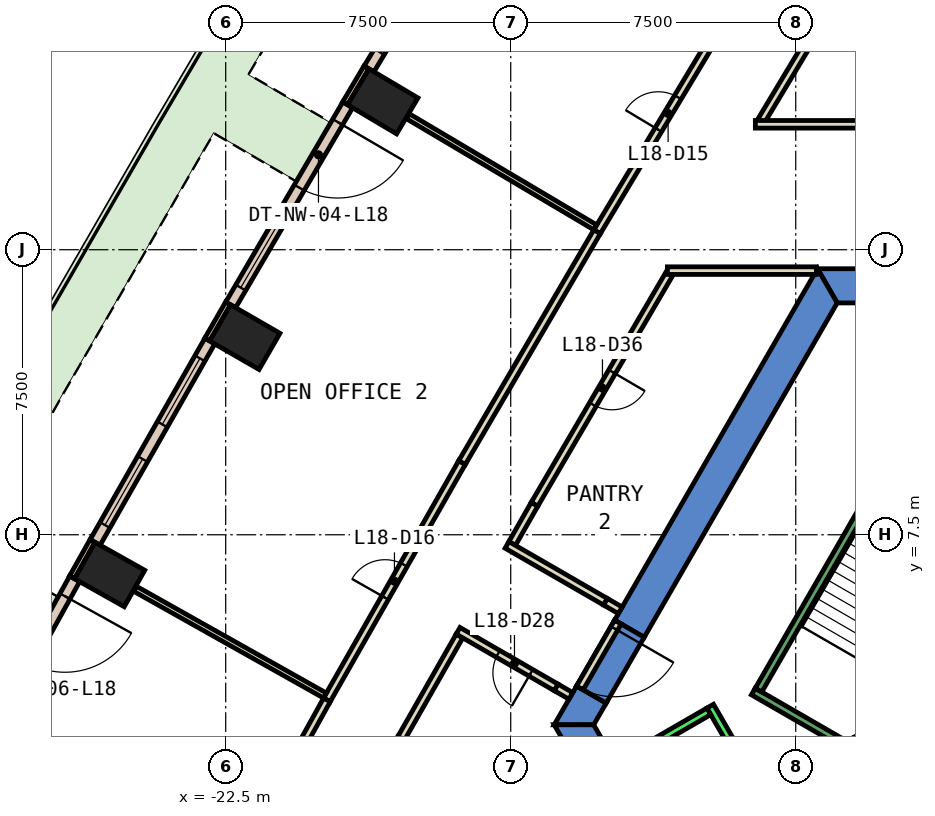
"""IFC4 building model, lengths in metres.
Left out: names, types, materials, properties, quantities, classifications, styles, units other than length and angle.
Written with IfcOpenShell. Run it as: python <this file> out.ifc"""

import sys

from ifc_helpers import new_model, si_unit, direction, frame, frame_2d, origin, origin_2d, place, context, subcontext, project, spatial, polyline, rectangle, outline, extrude, element, fill, save


model = new_model("IFC4")
c1 = context("Model", 3, precision=1e-05, world=origin(), true_north=direction((0.0, 1.0)))
c2 = subcontext(c1, "Body", "Model", "MODEL_VIEW")
j1 = project(units=[si_unit("LENGTHUNIT", "METRE"), si_unit("PLANEANGLEUNIT", "RADIAN")], contexts=[c1])
p1 = place(None, origin())
s1 = spatial("IfcSite", under=j1, at=p1, CompositionType="ELEMENT")
p2 = place(p1, origin())
s2 = spatial("IfcBuilding", under=s1, at=p2, CompositionType="ELEMENT")
p3 = place(p2, frame((0.0, 0.0, 86.6)))
s3 = spatial("IfcBuildingStorey", under=s2, at=p3, CompositionType="ELEMENT", Elevation=86.6)
for number, where, z_axis, x_axis in (
    (1, (-18.367, 18.904, 0.0), (0.0, 0.0, 1.0), (0.51, 0.86, 0.0)),
    (2, (-21.997, 12.7, 0.0), (0.0, 0.0, 1.0), (0.5, 0.866, 0.0)),
    (3, (-25.554, 6.454, 0.0), (0.0, 0.0, 1.0), (0.49, 0.872, 0.0)),
):
    element("IfcColumn", number, at=place(p3, frame(where, z_axis=z_axis, x_axis=x_axis)), inside=s3, PredefinedType="COLUMN", context=c2, shape_type="SweptSolid", body=[
        extrude(rectangle(XDim=1.1, YDim=1.5, at=origin_2d()), origin(), (0.0, 0.0, 1.0), 3.8),
    ])
p4 = place(p3, frame((0.0, 0.0, -0.6)))
e4 = element("IfcWall", 4, at=p4, inside=s3, PredefinedType="SHEAR", context=c2, shape_type="SweptSolid", body=[
    extrude(outline(polyline([(-4.55, 13.6), (-4.55, 14.5), (-6.928, 14.5), (-6.409, 13.6), (-4.55, 13.6)])), origin(), (0.0, 0.0, 1.0), 4.4),
])
p5 = place(p3, frame((0.0, 0.0, -0.6)))
e5 = element("IfcWall", 5, at=p5, inside=s3, PredefinedType="SHEAR", context=c2, shape_type="SweptSolid", body=[
    extrude(outline(polyline([(-12.267, 5.252), (-11.488, 4.802), (-6.409, 13.6), (-6.928, 14.5), (-12.267, 5.252)])), origin(), (0.0, 0.0, 1.0), 4.4),
])
p6 = place(p3, frame((0.0, 0.0, -0.6)))
e6 = element("IfcWall", 6, at=p6, inside=s3, PredefinedType="SHEAR", context=c2, shape_type="SweptSolid", body=[
    extrude(outline(polyline([(-12.488, 3.07), (-13.267, 3.52), (-13.856, 2.5), (-12.817, 2.5), (-12.488, 3.07)])), origin(), (0.0, 0.0, 1.0), 4.4),
])
p7 = place(p3, frame((0.0, 0.0, 3.6)))
e7 = element("IfcWall", 7, at=p7, inside=s3, PredefinedType="SHEAR", context=c2, shape_type="SweptSolid", body=[
    extrude(outline(polyline([(-13.267, 3.52), (-12.488, 3.07), (-11.488, 4.802), (-12.267, 5.252), (-13.267, 3.52)])), origin(), (0.0, 0.0, 1.0), 0.2),
])
p8 = place(p3, frame((0.0, 0.0, -0.6)))
e8 = element("IfcWall", 8, at=p8, inside=s3, PredefinedType="SHEAR", context=c2, shape_type="SweptSolid", body=[
    extrude(outline(polyline([(-13.856, 2.5), (-6.928, -9.5), (-6.409, -8.6), (-12.817, 2.5), (-13.856, 2.5)])), origin(), (0.0, 0.0, 1.0), 4.4),
])
p9 = place(p3, frame((-18.796, 19.798, 0.0), z_axis=(0.0, 0.0, 1.0), x_axis=(-0.510082245696, -0.860125631885, 0.0)))
e9 = element("IfcWall", 9, at=p9, inside=s3, PredefinedType="STANDARD", context=c2, shape_type="SweptSolid", body=[
    extrude(rectangle(XDim=1.1, YDim=0.15, at=frame_2d((0.55, 0.0))), origin(), (0.0, 0.0, 1.0), 3.8),
])
p10 = place(p3, frame((-22.436, 13.589, 0.0), z_axis=(0.0, 0.0, 1.0), x_axis=(-0.499837685251, -0.86611909597, 0.0)))
e10 = element("IfcWall", 10, at=p10, inside=s3, PredefinedType="STANDARD", context=c2, shape_type="SweptSolid", body=[
    extrude(rectangle(XDim=1.1, YDim=0.15, at=frame_2d((0.55, 0.0))), origin(), (0.0, 0.0, 1.0), 3.8),
])
p11 = place(p3, frame((-26.004, 7.338, 0.0), z_axis=(0.0, 0.0, 1.0), x_axis=(-0.490008344094, -0.871717742574, 0.0)))
e11 = element("IfcWall", 11, at=p11, inside=s3, PredefinedType="STANDARD", context=c2, shape_type="SweptSolid", body=[
    extrude(rectangle(XDim=1.1, YDim=0.15, at=frame_2d((0.55, 0.0))), origin(), (0.0, 0.0, 1.0), 3.8),
])
p12 = place(p3, frame((-15.588, 24.984, 0.0), z_axis=(0.0, 0.0, 1.0), x_axis=(-0.515102053092, -0.857128855483, 0.0)))
e12 = element("IfcWall", 12, at=p12, inside=s3, PredefinedType="STANDARD", context=c2, shape_type="SweptSolid", body=[
    extrude(rectangle(XDim=6.098, YDim=0.3, at=frame_2d((3.049, 0.0))), origin(), (0.0, 0.0, 1.0), 3.8),
])
p13 = place(p12, frame((0.525, 0.0, 0.9)))
e13 = element("IfcOpeningElement", 13, at=p13, cuts=e12, PredefinedType="OPENING", context=c2, shape_type="SweptSolid", body=[
    extrude(rectangle(XDim=2.0, YDim=2.6, at=frame_2d((1.0, 1.3))), frame((0.0, 0.16, 0.0), z_axis=(0.0, -1.0, 0.0), x_axis=(1.0, 0.0, 0.0)), (0.0, 0.0, 1.0), 0.32),
])
p14 = place(p12, frame((3.574, 0.0, 0.9)))
e14 = element("IfcOpeningElement", 14, at=p14, cuts=e12, PredefinedType="OPENING", context=c2, shape_type="SweptSolid", body=[
    extrude(rectangle(XDim=2.0, YDim=2.6, at=frame_2d((1.0, 1.3))), frame((0.0, 0.16, 0.0), z_axis=(0.0, -1.0, 0.0), x_axis=(1.0, 0.0, 0.0)), (0.0, 0.0, 1.0), 0.32),
])
p15 = place(p3, frame((-19.289, 18.813, 0.0), z_axis=(0.0, 0.0, 1.0), x_axis=(-0.504998117261, -0.863120444413, 0.0)))
e15 = element("IfcWall", 15, at=p15, inside=s3, PredefinedType="STANDARD", context=c2, shape_type="SweptSolid", body=[
    extrude(rectangle(XDim=6.099, YDim=0.3, at=frame_2d((3.049, 0.0))), origin(), (0.0, 0.0, 1.0), 3.8),
])
p16 = place(p15, frame((0.525, 0.0, 0.0)))
e16 = element("IfcOpeningElement", 16, at=p16, cuts=e15, PredefinedType="OPENING", context=c2, shape_type="SweptSolid", body=[
    extrude(rectangle(XDim=2.0, YDim=2.4, at=frame_2d((1.0, 1.2))), frame((0.0, 0.16, 0.0), z_axis=(0.0, -1.0, 0.0), x_axis=(1.0, 0.0, 0.0)), (0.0, 0.0, 1.0), 0.32),
])
p17 = place(p15, frame((3.574, 0.0, 0.9)))
e17 = element("IfcOpeningElement", 17, at=p17, cuts=e15, PredefinedType="OPENING", context=c2, shape_type="SweptSolid", body=[
    extrude(rectangle(XDim=2.0, YDim=2.6, at=frame_2d((1.0, 1.3))), frame((0.0, 0.16, 0.0), z_axis=(0.0, -1.0, 0.0), x_axis=(1.0, 0.0, 0.0)), (0.0, 0.0, 1.0), 0.32),
])
p18 = place(p3, frame((-22.918, 12.598, 0.0), z_axis=(0.0, 0.0, 1.0), x_axis=(-0.49492259535, -0.868937065967, 0.0)))
e18 = element("IfcWall", 18, at=p18, inside=s3, PredefinedType="STANDARD", context=c2, shape_type="SweptSolid", body=[
    extrude(rectangle(XDim=6.098, YDim=0.3, at=frame_2d((3.049, 0.0))), origin(), (0.0, 0.0, 1.0), 3.8),
])
p19 = place(p18, frame((0.525, 0.0, 0.9)))
e19 = element("IfcOpeningElement", 19, at=p19, cuts=e18, PredefinedType="OPENING", context=c2, shape_type="SweptSolid", body=[
    extrude(rectangle(XDim=2.0, YDim=2.6, at=frame_2d((1.0, 1.3))), frame((0.0, 0.16, 0.0), z_axis=(0.0, -1.0, 0.0), x_axis=(1.0, 0.0, 0.0)), (0.0, 0.0, 1.0), 0.32),
])
p20 = place(p18, frame((3.574, 0.0, 0.9)))
e20 = element("IfcOpeningElement", 20, at=p20, cuts=e18, PredefinedType="OPENING", context=c2, shape_type="SweptSolid", body=[
    extrude(rectangle(XDim=2.0, YDim=2.6, at=frame_2d((1.0, 1.3))), frame((0.0, 0.16, 0.0), z_axis=(0.0, -1.0, 0.0), x_axis=(1.0, 0.0, 0.0)), (0.0, 0.0, 1.0), 0.32),
])
p21 = place(p3, frame((-26.474, 6.341, 0.0), z_axis=(0.0, 0.0, 1.0), x_axis=(-0.484823579315, -0.874611969356, 0.0)))
e21 = element("IfcWall", 21, at=p21, inside=s3, PredefinedType="STANDARD", context=c2, shape_type="SweptSolid", body=[
    extrude(rectangle(XDim=6.099, YDim=0.3, at=frame_2d((3.049, 0.0))), origin(), (0.0, 0.0, 1.0), 3.8),
])
p22 = place(p21, frame((0.525, 0.0, 0.0)))
e22 = element("IfcOpeningElement", 22, at=p22, cuts=e21, PredefinedType="OPENING", context=c2, shape_type="SweptSolid", body=[
    extrude(rectangle(XDim=2.0, YDim=2.4, at=frame_2d((1.0, 1.2))), frame((0.0, 0.16, 0.0), z_axis=(0.0, -1.0, 0.0), x_axis=(1.0, 0.0, 0.0)), (0.0, 0.0, 1.0), 0.32),
])
p23 = place(p21, frame((3.574, 0.0, 0.9)))
e23 = element("IfcOpeningElement", 23, at=p23, cuts=e21, PredefinedType="OPENING", context=c2, shape_type="SweptSolid", body=[
    extrude(rectangle(XDim=2.0, YDim=2.6, at=frame_2d((1.0, 1.3))), frame((0.0, 0.16, 0.0), z_axis=(0.0, -1.0, 0.0), x_axis=(1.0, 0.0, 0.0)), (0.0, 0.0, 1.0), 0.32),
])
p24 = place(p3, frame((-7.148, 20.488, 0.0), z_axis=(0.0, 0.0, 1.0), x_axis=(-0.515008089027, -0.857185317325, 0.0)))
e24 = element("IfcWall", 24, at=p24, inside=s3, PredefinedType="PARTITIONING", context=c2, shape_type="SweptSolid", body=[
    extrude(rectangle(XDim=2.452, YDim=0.2, at=frame_2d((1.226, 0.0))), origin(), (0.0, 0.0, 1.0), 3.8),
])
p25 = place(p3, frame((-10.797, 14.415, 0.0), z_axis=(0.0, 0.0, 1.0), x_axis=(-0.505008297342, -0.863114488128, 0.0)))
e25 = element("IfcWall", 25, at=p25, inside=s3, PredefinedType="PARTITIONING", context=c2, shape_type="SweptSolid", body=[
    extrude(rectangle(XDim=7.085, YDim=0.2, at=frame_2d((3.542, 0.0))), origin(), (0.0, 0.0, 1.0), 3.8),
])
p26 = place(p25, frame((3.043, 0.0, 0.0)))
e26 = element("IfcOpeningElement", 26, at=p26, cuts=e25, PredefinedType="OPENING", context=c2, shape_type="SweptSolid", body=[
    extrude(rectangle(XDim=1.0, YDim=2.1, at=frame_2d((0.5, 1.05))), frame((0.0, 0.11, 0.0), z_axis=(0.0, -1.0, 0.0), x_axis=(1.0, 0.0, 0.0)), (0.0, 0.0, 1.0), 0.22),
])
p27 = place(p3, frame((-14.375, 8.3, 0.0), z_axis=(0.0, 0.0, 1.0), x_axis=(-0.495074026382, -0.868850797549, 0.0)))
e27 = element("IfcWall", 27, at=p27, inside=s3, PredefinedType="PARTITIONING", context=c2, shape_type="SweptSolid", body=[
    extrude(rectangle(XDim=1.186, YDim=0.2, at=frame_2d((0.593, 0.0))), origin(), (0.0, 0.0, 1.0), 3.8),
])
p28 = place(p3, frame((-15.098, 7.233, 0.0), z_axis=(0.0, 0.0, 1.0), x_axis=(0.866101363304, -0.499868411168, 0.0)))
e28 = element("IfcWall", 28, at=p28, inside=s3, PredefinedType="PARTITIONING", context=c2, shape_type="SweptSolid", body=[
    extrude(rectangle(XDim=2.992, YDim=0.2, at=frame_2d((1.496, 0.0))), origin(), (0.0, 0.0, 1.0), 3.8),
])
p29 = place(p3, frame((-13.417, 3.26, 0.0), z_axis=(0.0, 0.0, 1.0), x_axis=(-0.866032067792, 0.499988457423, 0.0)))
e29 = element("IfcWall", 29, at=p29, inside=s3, PredefinedType="PARTITIONING", context=c2, shape_type="SweptSolid", body=[
    extrude(rectangle(XDim=0.45, YDim=0.2, at=frame_2d((0.225, 0.0))), origin(), (0.0, 0.0, 1.0), 2.4),
])
p30 = place(p3, frame((-16.348, 4.837, 0.0), z_axis=(0.0, 0.0, 1.0), x_axis=(-0.495121026513, -0.868824015037, 0.0)))
e30 = element("IfcWall", 30, at=p30, inside=s3, PredefinedType="PARTITIONING", context=c2, shape_type="SweptSolid", body=[
    extrude(rectangle(XDim=3.101, YDim=0.2, at=frame_2d((1.55, 0.0))), origin(), (0.0, 0.0, 1.0), 3.8),
])
p31 = place(p3, frame((-12.728, 15.473, 0.0), z_axis=(0.0, 0.0, 1.0), x_axis=(0.515010673306, 0.857183764651, 0.0)))
e31 = element("IfcWall", 31, at=p31, inside=s3, PredefinedType="PARTITIONING", context=c2, shape_type="SweptSolid", body=[
    extrude(rectangle(XDim=7.111, YDim=0.2, at=frame_2d((3.555, 0.0))), origin(), (0.0, 0.0, 1.0), 3.8),
])
p32 = place(p31, frame((3.13, 0.0, 0.0)))
e32 = element("IfcOpeningElement", 32, at=p32, cuts=e31, PredefinedType="OPENING", context=c2, shape_type="SweptSolid", body=[
    extrude(rectangle(XDim=1.0, YDim=2.1, at=frame_2d((0.5, 1.05))), frame((0.0, 0.11, 0.0), z_axis=(0.0, -1.0, 0.0), x_axis=(1.0, 0.0, 0.0)), (0.0, 0.0, 1.0), 0.22),
])
p33 = place(p3, frame((-19.838, 3.156, 0.0), z_axis=(0.0, 0.0, 1.0), x_axis=(0.494978648769, 0.868905137091, 0.0)))
e33 = element("IfcWall", 33, at=p33, inside=s3, PredefinedType="PARTITIONING", context=c2, shape_type="SweptSolid", body=[
    extrude(rectangle(XDim=7.186, YDim=0.2, at=frame_2d((3.593, 0.0))), origin(), (0.0, 0.0, 1.0), 3.8),
])
p34 = place(p33, frame((3.093, 0.0, 0.0)))
e34 = element("IfcOpeningElement", 34, at=p34, cuts=e33, PredefinedType="OPENING", context=c2, shape_type="SweptSolid", body=[
    extrude(rectangle(XDim=1.0, YDim=2.1, at=frame_2d((0.5, 1.05))), frame((0.0, 0.11, 0.0), z_axis=(0.0, -1.0, 0.0), x_axis=(1.0, 0.0, 0.0)), (0.0, 0.0, 1.0), 0.22),
])
p35 = place(p3, frame((-16.281, 9.4, 0.0), z_axis=(0.0, 0.0, 1.0), x_axis=(0.504973069247, 0.863135099121, 0.0)))
e35 = element("IfcWall", 35, at=p35, inside=s3, PredefinedType="PARTITIONING", context=c2, shape_type="SweptSolid", body=[
    extrude(rectangle(XDim=7.036, YDim=0.2, at=frame_2d((3.518, 0.0))), origin(), (0.0, 0.0, 1.0), 3.8),
])
p36 = place(p3, frame((-23.284, -3.064, 0.0), z_axis=(0.0, 0.0, 1.0), x_axis=(0.48478560119, 0.874633020689, 0.0)))
e36 = element("IfcWall", 36, at=p36, inside=s3, PredefinedType="PARTITIONING", context=c2, shape_type="SweptSolid", body=[
    extrude(rectangle(XDim=7.11, YDim=0.2, at=frame_2d((3.555, 0.0))), origin(), (0.0, 0.0, 1.0), 3.8),
])
p37 = place(p36, frame((3.13, 0.0, 0.0)))
e37 = element("IfcOpeningElement", 37, at=p37, cuts=e36, PredefinedType="OPENING", context=c2, shape_type="SweptSolid", body=[
    extrude(rectangle(XDim=1.0, YDim=2.1, at=frame_2d((0.5, 1.05))), frame((0.0, 0.11, 0.0), z_axis=(0.0, -1.0, 0.0), x_axis=(1.0, 0.0, 0.0)), (0.0, 0.0, 1.0), 0.22),
])
p38 = place(p3, frame((-8.563, 18.3, 0.0), z_axis=(0.0, 0.0, 1.0), x_axis=(1.0, 0.0, 0.0)))
e38 = element("IfcWall", 38, at=p38, inside=s3, PredefinedType="PARTITIONING", context=c2, shape_type="SweptSolid", body=[
    extrude(rectangle(XDim=8.163, YDim=0.2, at=frame_2d((4.082, 0.0))), origin(), (0.0, 0.0, 1.0), 3.8),
])
p39 = place(p38, frame((3.806, 0.0, 0.0)))
e39 = element("IfcOpeningElement", 39, at=p39, cuts=e38, PredefinedType="OPENING", context=c2, shape_type="SweptSolid", body=[
    extrude(rectangle(XDim=1.0, YDim=2.1, at=frame_2d((0.5, 1.05))), frame((0.0, 0.11, 0.0), z_axis=(0.0, -1.0, 0.0), x_axis=(1.0, 0.0, 0.0)), (0.0, 0.0, 1.0), 0.22),
])
p40 = place(p38, frame((4.906, 0.0, 0.0)))
e40 = element("IfcOpeningElement", 40, at=p40, cuts=e38, PredefinedType="OPENING", context=c2, shape_type="SweptSolid", body=[
    extrude(rectangle(XDim=1.0, YDim=2.1, at=frame_2d((0.5, 1.05))), frame((0.0, 0.11, 0.0), z_axis=(0.0, -1.0, 0.0), x_axis=(1.0, 0.0, 0.0)), (0.0, 0.0, 1.0), 0.22),
])
p41 = place(p3, frame((-6.957, 14.45, 0.0), z_axis=(0.0, 0.0, 1.0), x_axis=(-1.0, 0.0, 0.0)))
e41 = element("IfcWall", 41, at=p41, inside=s3, PredefinedType="PARTITIONING", context=c2, shape_type="SweptSolid", body=[
    extrude(rectangle(XDim=3.92, YDim=0.2, at=frame_2d((1.96, 0.0))), origin(), (0.0, 0.0, 1.0), 3.8),
])
p42 = place(p3, frame((-12.776, 15.589, 0.0), z_axis=(0.0, 0.0, 1.0), x_axis=(-0.860225086153, 0.509914503768, 0.0)))
e42 = element("IfcWall", 42, at=p42, inside=s3, PredefinedType="PARTITIONING", context=c2, shape_type="SweptSolid", body=[
    extrude(rectangle(XDim=5.73, YDim=0.15, at=frame_2d((2.865, 0.0))), origin(), (0.0, 0.0, 1.0), 3.8),
])
p43 = place(p3, frame((-19.888, 3.27, 0.0), z_axis=(0.0, 0.0, 1.0), x_axis=(-0.871789386467, 0.489880868828, 0.0)))
e43 = element("IfcWall", 43, at=p43, inside=s3, PredefinedType="PARTITIONING", context=c2, shape_type="SweptSolid", body=[
    extrude(rectangle(XDim=5.73, YDim=0.15, at=frame_2d((2.865, 0.0))), origin(), (0.0, 0.0, 1.0), 3.8),
])
p44 = place(p3, frame((-12.18, 5.202, 0.0), z_axis=(0.0, 0.0, 1.0), x_axis=(-0.50002537861, -0.866010750942, 0.0)))
e44 = element("IfcWall", 44, at=p44, inside=s3, PredefinedType="PARTITIONING", context=c2, shape_type="SweptSolid", body=[
    extrude(rectangle(XDim=2.0, YDim=0.2, at=frame_2d((1.0, 0.0))), origin(), (0.0, 0.0, 1.0), 2.4),
])
p45 = place(p44, frame((0.19, 0.0, 0.0)))
e45 = element("IfcOpeningElement", 45, at=p45, cuts=e44, PredefinedType="OPENING", context=c2, shape_type="SweptSolid", body=[
    extrude(rectangle(XDim=1.8, YDim=2.1, at=frame_2d((0.9, 1.05))), frame((0.0, 0.11, 0.0), z_axis=(0.0, -1.0, 0.0), x_axis=(1.0, 0.0, 0.0)), (0.0, 0.0, 1.0), 0.22),
])
p46 = place(p3, frame((-12.506, 5.737, 0.0), z_axis=(0.0, 0.0, 1.0), x_axis=(0.865624510465, -0.500693725627, 0.0)))
e46 = element("IfcWall", 46, at=p46, inside=s3, PredefinedType="PARTITIONING", context=c2, shape_type="SweptSolid", body=[
    extrude(rectangle(XDim=0.449, YDim=0.2, at=frame_2d((0.225, 0.0))), origin(), (0.0, 0.0, 1.0), 2.4),
])
p47 = place(p3, frame((-13.807, 3.485, 0.0), z_axis=(0.0, 0.0, 1.0), x_axis=(-0.865947944451, 0.500134139508, 0.0)))
e47 = element("IfcWall", 47, at=p47, inside=s3, PredefinedType="PARTITIONING", context=c2, shape_type="SweptSolid", body=[
    extrude(rectangle(XDim=2.977, YDim=0.2, at=frame_2d((1.489, 0.0))), origin(), (0.0, 0.0, 1.0), 3.8),
])
p48 = place(p47, frame((0.764, 0.0, 0.0)))
e48 = element("IfcOpeningElement", 48, at=p48, cuts=e47, PredefinedType="OPENING", context=c2, shape_type="SweptSolid", body=[
    extrude(rectangle(XDim=1.0, YDim=2.1, at=frame_2d((0.5, 1.05))), frame((0.0, 0.11, 0.0), z_axis=(0.0, -1.0, 0.0), x_axis=(1.0, 0.0, 0.0)), (0.0, 0.0, 1.0), 0.22),
])
p49 = place(p3, frame((-5.94, 2.188, 0.0), z_axis=(0.0, 0.0, 1.0), x_axis=(0.49994636267, -0.866056369097, 0.0)))
e49 = element("IfcWall", 49, at=p49, inside=s3, PredefinedType="STANDARD", context=c2, shape_type="SweptSolid", body=[
    extrude(rectangle(XDim=2.8, YDim=0.2, at=frame_2d((1.4, 0.0))), origin(), (0.0, 0.0, 1.0), 3.8),
])
p50 = place(p49, frame((1.225, 0.0, 0.0)))
e50 = element("IfcOpeningElement", 50, at=p50, cuts=e49, PredefinedType="OPENING", context=c2, shape_type="SweptSolid", body=[
    extrude(rectangle(XDim=1.1, YDim=2.1, at=frame_2d((0.55, 1.05))), frame((0.0, 0.11, 0.0), z_axis=(0.0, -1.0, 0.0), x_axis=(1.0, 0.0, 0.0)), (0.0, 0.0, 1.0), 0.22),
])
p51 = place(p3, frame((-9.751, 2.99, 0.0), z_axis=(0.0, 0.0, 1.0), x_axis=(0.50000090737, -0.866024879913, 0.0)))
e51 = element("IfcWall", 51, at=p51, inside=s3, PredefinedType="STANDARD", context=c2, shape_type="SweptSolid", body=[
    extrude(rectangle(XDim=10.6, YDim=0.2, at=frame_2d((5.3, 0.0))), origin(), (0.0, 0.0, 1.0), 3.8),
])
p52 = place(p3, frame((-9.788, 2.853, 0.0), z_axis=(0.0, 0.0, 1.0), x_axis=(-0.865998541277, -0.500046524342, 0.0)))
e52 = element("IfcWall", 52, at=p52, inside=s3, PredefinedType="STANDARD", context=c2, shape_type="SweptSolid", body=[
    extrude(rectangle(XDim=2.5, YDim=0.2, at=frame_2d((1.25, 0.0))), origin(), (0.0, 0.0, 1.0), 3.8),
])
p53 = place(p3, frame((-6.25, 2.01, 0.0), z_axis=(0.0, 0.0, 1.0), x_axis=(-0.86611865017, 0.499838457731, 0.0)))
e53 = element("IfcWall", 53, at=p53, inside=s3, PredefinedType="STANDARD", context=c2, shape_type="SweptSolid", body=[
    extrude(rectangle(XDim=2.733, YDim=0.2, at=frame_2d((1.366, 0.0))), origin(), (0.0, 0.0, 1.0), 3.8),
])
p54 = place(p3, frame((-5.03, 9.388, 0.0), z_axis=(0.0, 0.0, 1.0), x_axis=(-0.499978703459, -0.866037698999, 0.0)))
e54 = element("IfcWall", 54, at=p54, inside=s3, PredefinedType="STANDARD", context=c2, shape_type="SweptSolid", body=[
    extrude(rectangle(XDim=6.9, YDim=0.2, at=frame_2d((3.45, 0.0))), origin(), (0.0, 0.0, 1.0), 3.8),
])
p55 = place(p14, origin())
e55 = element("IfcWindow", 55, at=p55, inside=s3, PartitioningType="SINGLE_PANEL", PredefinedType="WINDOW", context=c2, shape_type="SweptSolid", body=[
    extrude(rectangle(XDim=2.0, YDim=2.6, at=frame_2d((1.0, 1.3))), frame((0.0, 0.03, 0.0), z_axis=(0.0, -1.0, 0.0), x_axis=(1.0, 0.0, 0.0)), (0.0, 0.0, 1.0), 0.06),
])
fill(e14, e55)
p56 = place(p16, origin())
e56 = element("IfcDoor", 56, at=p56, inside=s3, OperationType="SLIDING_TO_LEFT", PredefinedType="DOOR", context=c2, shape_type="SweptSolid", body=[
    extrude(rectangle(XDim=2.0, YDim=2.4, at=frame_2d((1.0, 1.2))), frame((0.0, 0.025, 0.0), z_axis=(0.0, -1.0, 0.0), x_axis=(1.0, 0.0, 0.0)), (0.0, 0.0, 1.0), 0.05),
])
fill(e16, e56)
p57 = place(p17, origin())
e57 = element("IfcWindow", 57, at=p57, inside=s3, PartitioningType="SINGLE_PANEL", PredefinedType="WINDOW", context=c2, shape_type="SweptSolid", body=[
    extrude(rectangle(XDim=2.0, YDim=2.6, at=frame_2d((1.0, 1.3))), frame((0.0, 0.03, 0.0), z_axis=(0.0, -1.0, 0.0), x_axis=(1.0, 0.0, 0.0)), (0.0, 0.0, 1.0), 0.06),
])
fill(e17, e57)
p58 = place(p19, origin())
e58 = element("IfcWindow", 58, at=p58, inside=s3, PartitioningType="SINGLE_PANEL", PredefinedType="WINDOW", context=c2, shape_type="SweptSolid", body=[
    extrude(rectangle(XDim=2.0, YDim=2.6, at=frame_2d((1.0, 1.3))), frame((0.0, 0.03, 0.0), z_axis=(0.0, -1.0, 0.0), x_axis=(1.0, 0.0, 0.0)), (0.0, 0.0, 1.0), 0.06),
])
fill(e19, e58)
p59 = place(p20, origin())
e59 = element("IfcWindow", 59, at=p59, inside=s3, PartitioningType="SINGLE_PANEL", PredefinedType="WINDOW", context=c2, shape_type="SweptSolid", body=[
    extrude(rectangle(XDim=2.0, YDim=2.6, at=frame_2d((1.0, 1.3))), frame((0.0, 0.03, 0.0), z_axis=(0.0, -1.0, 0.0), x_axis=(1.0, 0.0, 0.0)), (0.0, 0.0, 1.0), 0.06),
])
fill(e20, e59)
p60 = place(p22, origin())
e60 = element("IfcDoor", 60, at=p60, inside=s3, OperationType="SLIDING_TO_LEFT", PredefinedType="DOOR", context=c2, shape_type="SweptSolid", body=[
    extrude(rectangle(XDim=2.0, YDim=2.4, at=frame_2d((1.0, 1.2))), frame((0.0, 0.025, 0.0), z_axis=(0.0, -1.0, 0.0), x_axis=(1.0, 0.0, 0.0)), (0.0, 0.0, 1.0), 0.05),
])
fill(e22, e60)
p61 = place(p32, origin())
e61 = element("IfcDoor", 61, at=p61, inside=s3, OperationType="SINGLE_SWING_LEFT", PredefinedType="DOOR", context=c2, shape_type="SweptSolid", body=[
    extrude(rectangle(XDim=1.0, YDim=2.1, at=frame_2d((0.5, 1.05))), frame((0.0, 0.025, 0.0), z_axis=(0.0, -1.0, 0.0), x_axis=(1.0, 0.0, 0.0)), (0.0, 0.0, 1.0), 0.05),
])
fill(e32, e61)
p62 = place(p34, origin())
e62 = element("IfcDoor", 62, at=p62, inside=s3, OperationType="SINGLE_SWING_LEFT", PredefinedType="DOOR", context=c2, shape_type="SweptSolid", body=[
    extrude(rectangle(XDim=1.0, YDim=2.1, at=frame_2d((0.5, 1.05))), frame((0.0, 0.025, 0.0), z_axis=(0.0, -1.0, 0.0), x_axis=(1.0, 0.0, 0.0)), (0.0, 0.0, 1.0), 0.05),
])
fill(e34, e62)
p63 = place(p48, origin())
e63 = element("IfcDoor", 63, at=p63, inside=s3, OperationType="SINGLE_SWING_LEFT", PredefinedType="DOOR", context=c2, shape_type="SweptSolid", body=[
    extrude(rectangle(XDim=1.0, YDim=2.1, at=frame_2d((0.5, 1.05))), frame((0.0, 0.025, 0.0), z_axis=(0.0, -1.0, 0.0), x_axis=(1.0, 0.0, 0.0)), (0.0, 0.0, 1.0), 0.05),
])
fill(e48, e63)
p64 = place(p26, origin())
e64 = element("IfcDoor", 64, at=p64, inside=s3, OperationType="SINGLE_SWING_LEFT", PredefinedType="DOOR", context=c2, shape_type="SweptSolid", body=[
    extrude(rectangle(XDim=1.0, YDim=2.1, at=frame_2d((0.5, 1.05))), frame((0.0, 0.025, 0.0), z_axis=(0.0, -1.0, 0.0), x_axis=(1.0, 0.0, 0.0)), (0.0, 0.0, 1.0), 0.05),
])
fill(e26, e64)
p65 = place(p45, origin())
e65 = element("IfcDoor", 65, at=p65, inside=s3, OperationType="DOUBLE_DOOR_SINGLE_SWING", PredefinedType="DOOR", context=c2, shape_type="SweptSolid", body=[
    extrude(rectangle(XDim=1.8, YDim=2.1, at=frame_2d((0.9, 1.05))), frame((0.0, 0.025, 0.0), z_axis=(0.0, -1.0, 0.0), x_axis=(1.0, 0.0, 0.0)), (0.0, 0.0, 1.0), 0.05),
])
fill(e45, e65)
save(model, sys.argv[1])
